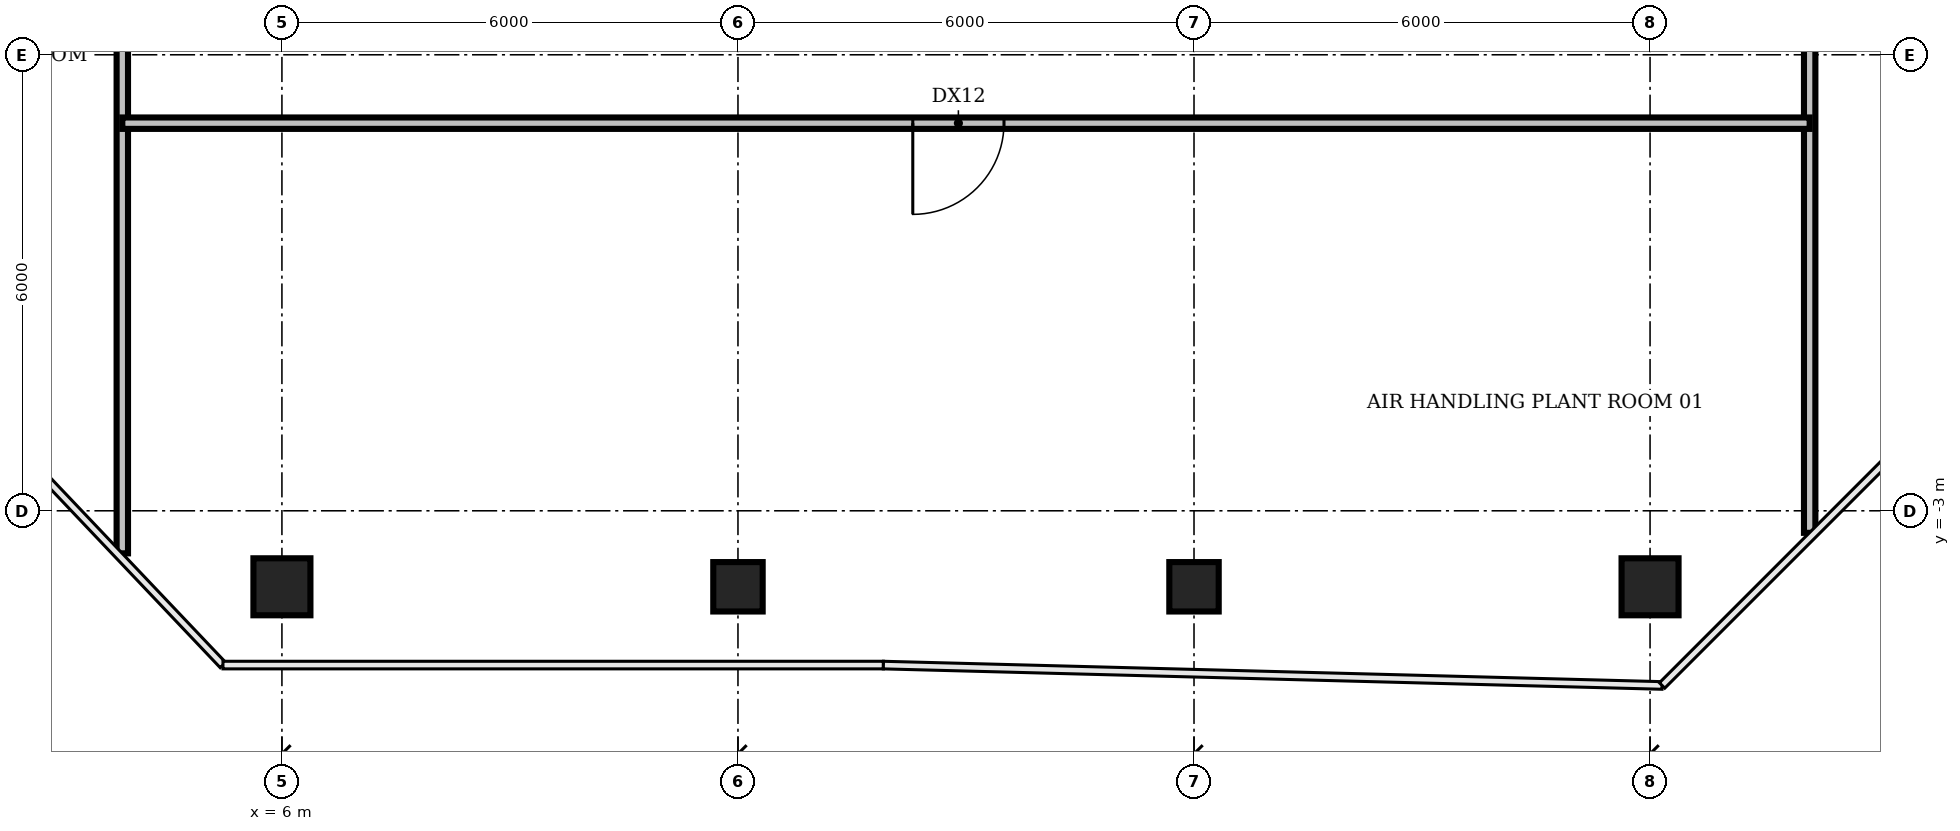
"""IFC4 building model, lengths in metres.
Left out: names, types, materials, properties, quantities, classifications, styles, units other than length and angle.
Written with IfcOpenShell. Run it as: python <this file> out.ifc"""

import sys

from ifc_helpers import new_model, si_unit, direction, frame, frame_2d, origin, origin_2d, place, context, subcontext, project, spatial, rectangle, circle, extrude, element, fill, save


model = new_model("IFC4")
c1 = context("Model", 3, precision=1e-05, world=origin(), true_north=direction((0.0, 1.0)))
c2 = subcontext(c1, "Body", "Model", "MODEL_VIEW")
j1 = project(units=[si_unit("LENGTHUNIT", "METRE"), si_unit("PLANEANGLEUNIT", "RADIAN")], contexts=[c1])
p1 = place(None, origin())
s1 = spatial("IfcSite", under=j1, at=p1, CompositionType="ELEMENT")
p2 = place(p1, origin())
s2 = spatial("IfcBuilding", under=s1, at=p2, CompositionType="ELEMENT")
p3 = place(p2, frame((0.0, 0.0, 339.8)))
s3 = spatial("IfcBuildingStorey", under=s2, at=p3, CompositionType="ELEMENT", Elevation=339.8)
p4 = place(p3, frame((6.0, -4.0, 0.0), z_axis=(0.0, 0.0, 1.0), x_axis=(1.0, 0.0, 0.0)))
e1 = element("IfcColumn", 1, at=p4, inside=s3, PredefinedType="COLUMN", context=c2, shape_type="SweptSolid", body=[
    extrude(circle(Radius=0.375, at=origin_2d()), origin(), (0.0, 0.0, 1.0), 3.9),
])
for number, where, z_axis, x_axis in (
    (2, (12.0, -4.0, 0.0), (0.0, 0.0, 1.0), (1.0, 0.0, 0.0)),
    (3, (18.0, -4.0, 0.0), (0.0, 0.0, 1.0), (1.0, 0.0, 0.0)),
):
    element("IfcColumn", number, at=place(p3, frame(where, z_axis=z_axis, x_axis=x_axis)), inside=s3, PredefinedType="COLUMN", context=c2, shape_type="SweptSolid", body=[
        extrude(rectangle(XDim=0.65, YDim=0.65, at=origin_2d()), origin(), (0.0, 0.0, 1.0), 3.9),
    ])
p5 = place(p3, frame((24.0, -4.0, 0.0), z_axis=(0.0, 0.0, 1.0), x_axis=(1.0, 0.0, 0.0)))
e4 = element("IfcColumn", 4, at=p5, inside=s3, PredefinedType="COLUMN", context=c2, shape_type="SweptSolid", body=[
    extrude(circle(Radius=0.375, at=origin_2d()), origin(), (0.0, 0.0, 1.0), 3.9),
])
p6 = place(p3, frame((3.9, -3.56, 0.0), z_axis=(0.0, 0.0, 1.0), x_axis=(0.0, 1.0, 0.0)))
e5 = element("IfcWall", 5, at=p6, inside=s3, PredefinedType="PARTITIONING", context=c2, shape_type="SweptSolid", body=[
    extrude(rectangle(XDim=8.66, YDim=0.15, at=frame_2d((4.33, 0.0))), origin(), (0.0, 0.0, 1.0), 2.95),
])
p7 = place(p3, frame((26.1, -3.29, 0.0), z_axis=(0.0, 0.0, 1.0), x_axis=(0.0, 1.0, 0.0)))
e6 = element("IfcWall", 6, at=p7, inside=s3, PredefinedType="PARTITIONING", context=c2, shape_type="SweptSolid", body=[
    extrude(rectangle(XDim=9.59, YDim=0.15, at=frame_2d((4.795, 0.0))), origin(), (0.0, 0.0, 1.0), 2.95),
])
p8 = place(p3, frame((26.1, 2.1, 0.0), z_axis=(0.0, 0.0, 1.0), x_axis=(-1.0, 0.0, 0.0)))
e7 = element("IfcWall", 7, at=p8, inside=s3, PredefinedType="PARTITIONING", context=c2, shape_type="SweptSolid", body=[
    extrude(rectangle(XDim=22.2, YDim=0.15, at=frame_2d((11.1, 0.0))), origin(), (0.0, 0.0, 1.0), 2.95),
])
p9 = place(p8, frame((10.6, 0.0, 0.0)))
e8 = element("IfcOpeningElement", 8, at=p9, cuts=e7, PredefinedType="OPENING", context=c2, shape_type="SweptSolid", body=[
    extrude(rectangle(XDim=1.2, YDim=2.1, at=frame_2d((0.6, 1.05))), frame((0.0, 0.085, 0.0), z_axis=(0.0, -1.0, 0.0), x_axis=(1.0, 0.0, 0.0)), (0.0, 0.0, 1.0), 0.17),
])
p10 = place(p9, origin())
e9 = element("IfcDoor", 9, at=p10, inside=s3, OperationType="SINGLE_SWING_RIGHT", PredefinedType="DOOR", context=c2, shape_type="SweptSolid", body=[
    extrude(rectangle(XDim=1.2, YDim=2.1, at=frame_2d((0.6, 1.05))), frame((0.0, 0.025, 0.0), z_axis=(0.0, -1.0, 0.0), x_axis=(1.0, 0.0, 0.0)), (0.0, 0.0, 1.0), 0.05),
])
fill(e8, e9)
save(model, sys.argv[1])
